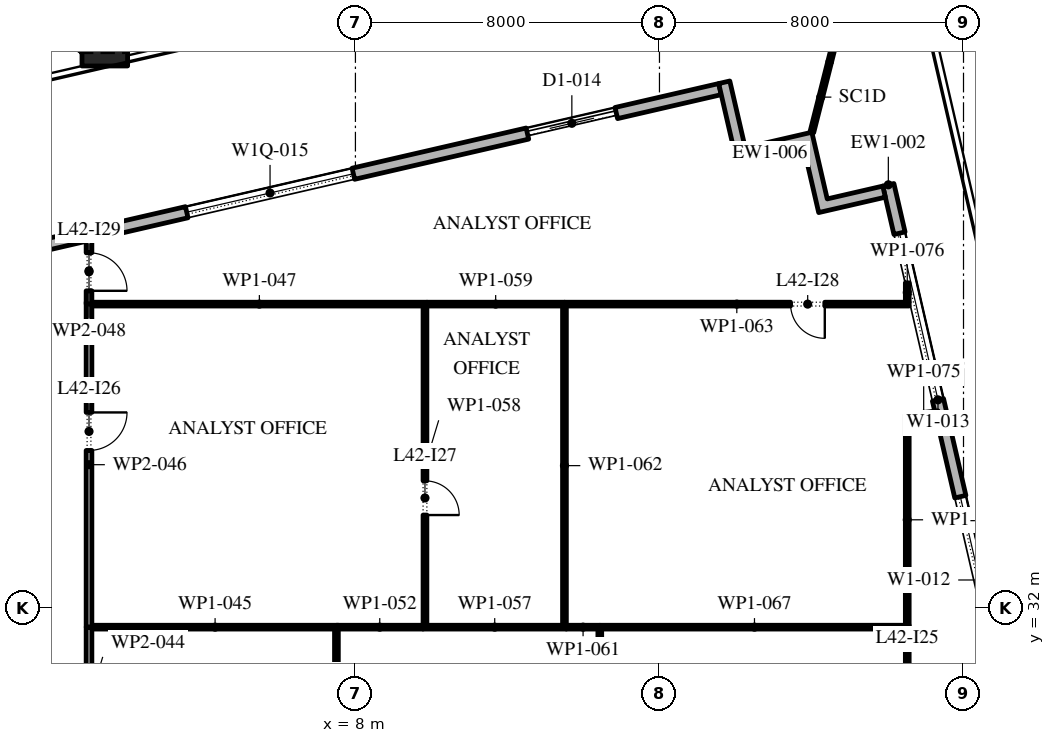
"""IFC4 building model, lengths in metres.
Left out: names, types, materials, properties, quantities, classifications, styles, units other than length and angle.
Written with IfcOpenShell. Run it as: python <this file> out.ifc"""

import sys

from ifc_helpers import new_model, si_unit, direction, frame, frame_2d, origin, origin_2d, place, context, subcontext, project, spatial, polyline, rectangle, outline, extrude, element, fill, save


model = new_model("IFC4")
c1 = context("Model", 3, precision=1e-05, world=origin(), true_north=direction((0.0, 1.0)))
c2 = subcontext(c1, "Body", "Model", "MODEL_VIEW")
j1 = project(units=[si_unit("LENGTHUNIT", "METRE"), si_unit("PLANEANGLEUNIT", "RADIAN")], contexts=[c1])
p1 = place(None, origin())
s1 = spatial("IfcSite", under=j1, at=p1, CompositionType="ELEMENT")
p2 = place(p1, origin())
s2 = spatial("IfcBuilding", under=s1, at=p2, CompositionType="ELEMENT")
p3 = place(p2, frame((0.0, 0.0, 192.6)))
s3 = spatial("IfcBuildingStorey", under=s2, at=p3, CompositionType="ELEMENT", Elevation=192.6)
p4 = place(p3, frame((1.406, 46.866, 0.0), z_axis=(-0.018883571463, 0.081616417765, 0.996484907603), x_axis=(-0.974262845894, -0.225414966474, 0.0)))
e1 = element("IfcColumn", 1, at=p4, inside=s3, PredefinedType="COLUMN", context=c2, shape_type="SweptSolid", body=[
    extrude(rectangle(XDim=1.2, YDim=1.2, at=origin_2d()), origin(), (0.0, 0.0, 1.0), 4.215),
])
p5 = place(p3, frame((33.157, -5.092, 0.0), z_axis=(0.0, 0.0, 1.0), x_axis=(-0.224950279389, 0.974370243697, 0.0)))
e2 = element("IfcWall", 2, at=p5, inside=s3, PredefinedType="STANDARD", context=c2, shape_type="SweptSolid", body=[
    extrude(rectangle(XDim=49.5, YDim=0.3, at=frame_2d((24.75, 0.0))), origin(), (0.0, 0.0, 1.0), 4.0),
])
p6 = place(p5, frame((2.207, 0.0, 0.0)))
e3 = element("IfcOpeningElement", 3, at=p6, cuts=e2, PredefinedType="OPENING", context=c2, shape_type="SweptSolid", body=[
    extrude(rectangle(XDim=2.4, YDim=3.125, at=frame_2d((1.2, 1.562))), frame((0.0, 0.16, 0.0), z_axis=(0.0, -1.0, 0.0), x_axis=(1.0, 0.0, 0.0)), (0.0, 0.0, 1.0), 0.32),
])
p7 = place(p5, frame((8.121, 0.0, 0.45)))
e4 = element("IfcOpeningElement", 4, at=p7, cuts=e2, PredefinedType="OPENING", context=c2, shape_type="SweptSolid", body=[
    extrude(rectangle(XDim=4.5, YDim=2.875, at=frame_2d((2.25, 1.438))), frame((0.0, 0.16, 0.0), z_axis=(0.0, -1.0, 0.0), x_axis=(1.0, 0.0, 0.0)), (0.0, 0.0, 1.0), 0.32),
])
p8 = place(p5, frame((15.236, 0.0, 0.45)))
e5 = element("IfcOpeningElement", 5, at=p8, cuts=e2, PredefinedType="OPENING", context=c2, shape_type="SweptSolid", body=[
    extrude(rectangle(XDim=4.5, YDim=2.875, at=frame_2d((2.25, 1.438))), frame((0.0, 0.16, 0.0), z_axis=(0.0, -1.0, 0.0), x_axis=(1.0, 0.0, 0.0)), (0.0, 0.0, 1.0), 0.32),
])
p9 = place(p5, frame((22.35, 0.0, 0.45)))
e6 = element("IfcOpeningElement", 6, at=p9, cuts=e2, PredefinedType="OPENING", context=c2, shape_type="SweptSolid", body=[
    extrude(rectangle(XDim=4.5, YDim=3.0, at=frame_2d((2.25, 1.5))), frame((0.0, 0.16, 0.0), z_axis=(0.0, -1.0, 0.0), x_axis=(1.0, 0.0, 0.0)), (0.0, 0.0, 1.0), 0.32),
])
p10 = place(p5, frame((30.514, 0.0, 0.0)))
e7 = element("IfcOpeningElement", 7, at=p10, cuts=e2, PredefinedType="OPENING", context=c2, shape_type="SweptSolid", body=[
    extrude(rectangle(XDim=2.4, YDim=3.45, at=frame_2d((1.2, 1.725))), frame((0.0, 0.16, 0.0), z_axis=(0.0, -1.0, 0.0), x_axis=(1.0, 0.0, 0.0)), (0.0, 0.0, 1.0), 0.32),
])
p11 = place(p5, frame((36.579, 0.0, 0.45)))
e8 = element("IfcOpeningElement", 8, at=p11, cuts=e2, PredefinedType="OPENING", context=c2, shape_type="SweptSolid", body=[
    extrude(rectangle(XDim=4.5, YDim=3.05, at=frame_2d((2.25, 1.525))), frame((0.0, 0.16, 0.0), z_axis=(0.0, -1.0, 0.0), x_axis=(1.0, 0.0, 0.0)), (0.0, 0.0, 1.0), 0.32),
])
p12 = place(p5, frame((43.693, 0.0, 0.45)))
e9 = element("IfcOpeningElement", 9, at=p12, cuts=e2, PredefinedType="OPENING", context=c2, shape_type="SweptSolid", body=[
    extrude(rectangle(XDim=4.5, YDim=3.05, at=frame_2d((2.25, 1.525))), frame((0.0, 0.16, 0.0), z_axis=(0.0, -1.0, 0.0), x_axis=(1.0, 0.0, 0.0)), (0.0, 0.0, 1.0), 0.32),
])
p13 = place(p3, frame((17.592, 45.657, 0.0), z_axis=(0.0, 0.0, 1.0), x_axis=(-0.974370243697, -0.224950279389, 0.0)))
e10 = element("IfcWall", 10, at=p13, inside=s3, PredefinedType="STANDARD", context=c2, shape_type="SweptSolid", body=[
    extrude(rectangle(XDim=49.5, YDim=0.3, at=frame_2d((24.75, 0.0))), origin(), (0.0, 0.0, 1.0), 4.0),
])
p14 = place(p13, frame((2.8, 0.0, 0.0)))
e11 = element("IfcOpeningElement", 11, at=p14, cuts=e10, PredefinedType="OPENING", context=c2, shape_type="SweptSolid", body=[
    extrude(rectangle(XDim=2.4, YDim=3.5, at=frame_2d((1.2, 1.75))), frame((0.0, 0.16, 0.0), z_axis=(0.0, -1.0, 0.0), x_axis=(1.0, 0.0, 0.0)), (0.0, 0.0, 1.0), 0.32),
])
p15 = place(p13, frame((9.9, 0.0, 0.45)))
e12 = element("IfcOpeningElement", 12, at=p15, cuts=e10, PredefinedType="OPENING", context=c2, shape_type="SweptSolid", body=[
    extrude(rectangle(XDim=4.5, YDim=2.45, at=frame_2d((2.25, 1.225))), frame((0.0, 0.16, 0.0), z_axis=(0.0, -1.0, 0.0), x_axis=(1.0, 0.0, 0.0)), (0.0, 0.0, 1.0), 0.32),
])
p16 = place(p13, frame((18.2, 0.0, 0.45)))
e13 = element("IfcOpeningElement", 13, at=p16, cuts=e10, PredefinedType="OPENING", context=c2, shape_type="SweptSolid", body=[
    extrude(rectangle(XDim=4.5, YDim=2.45, at=frame_2d((2.25, 1.225))), frame((0.0, 0.16, 0.0), z_axis=(0.0, -1.0, 0.0), x_axis=(1.0, 0.0, 0.0)), (0.0, 0.0, 1.0), 0.32),
])
p17 = place(p13, frame((26.5, 0.0, 0.45)))
e14 = element("IfcOpeningElement", 14, at=p17, cuts=e10, PredefinedType="OPENING", context=c2, shape_type="SweptSolid", body=[
    extrude(rectangle(XDim=4.5, YDim=2.525, at=frame_2d((2.25, 1.262))), frame((0.0, 0.16, 0.0), z_axis=(0.0, -1.0, 0.0), x_axis=(1.0, 0.0, 0.0)), (0.0, 0.0, 1.0), 0.32),
])
p18 = place(p13, frame((35.85, 0.0, 0.0)))
e15 = element("IfcOpeningElement", 15, at=p18, cuts=e10, PredefinedType="OPENING", context=c2, shape_type="SweptSolid", body=[
    extrude(rectangle(XDim=2.4, YDim=3.5, at=frame_2d((1.2, 1.75))), frame((0.0, 0.16, 0.0), z_axis=(0.0, -1.0, 0.0), x_axis=(1.0, 0.0, 0.0)), (0.0, 0.0, 1.0), 0.32),
])
p19 = place(p13, frame((43.1, 0.0, 0.45)))
e16 = element("IfcOpeningElement", 16, at=p19, cuts=e10, PredefinedType="OPENING", context=c2, shape_type="SweptSolid", body=[
    extrude(rectangle(XDim=4.5, YDim=2.675, at=frame_2d((2.25, 1.337))), frame((0.0, 0.16, 0.0), z_axis=(0.0, -1.0, 0.0), x_axis=(1.0, 0.0, 0.0)), (0.0, 0.0, 1.0), 0.32),
])
p20 = place(p3, origin())
e17 = element("IfcWall", 17, at=p20, inside=s3, PredefinedType="STANDARD", context=c2, shape_type="SweptSolid", body=[
    extrude(outline(polyline([(19.785, 44.162), (18.031, 43.757), (17.558, 45.803), (17.851, 45.871), (18.256, 44.117), (20.01, 44.522), (20.414, 42.768), (21.876, 43.105), (21.943, 42.813), (20.19, 42.408), (19.785, 44.162)])), origin(), (0.0, 0.0, 1.0), 4.0),
])
p21 = place(p3, frame((20.01, 44.522, -0.05), z_axis=(0.0, 0.0, 1.0), x_axis=(0.245426435893, 0.969415217832, 0.0)))
e18 = element("IfcWall", 18, at=p21, inside=s3, PredefinedType="STANDARD", context=c2, shape_type="SweptSolid", body=[
    extrude(rectangle(XDim=1.907, YDim=0.1, at=frame_2d((0.954, 0.0))), origin(), (0.0, 0.0, 1.0), 3.07),
])
p22 = place(p3, frame((0.99, 31.5, 0.0), z_axis=(0.0, 0.0, 1.0), x_axis=(0.0, -1.0, 0.0)))
e19 = element("IfcWall", 19, at=p22, inside=s3, PredefinedType="PARTITIONING", context=c2, shape_type="SweptSolid", body=[
    extrude(rectangle(XDim=3.95, YDim=0.15, at=frame_2d((1.975, 0.0))), origin(), (0.0, 0.0, 1.0), 4.0),
])
p23 = place(p22, frame((2.35, 0.0, 0.0)))
e20 = element("IfcOpeningElement", 20, at=p23, cuts=e19, PredefinedType="OPENING", context=c2, shape_type="SweptSolid", body=[
    extrude(rectangle(XDim=1.0, YDim=2.1, at=frame_2d((0.5, 1.05))), frame((0.0, 0.085, 0.0), z_axis=(0.0, -1.0, 0.0), x_axis=(1.0, 0.0, 0.0)), (0.0, 0.0, 1.0), 0.17),
])
p24 = place(p3, frame((1.065, 31.5, 0.0), z_axis=(0.0, 0.0, 1.0), x_axis=(1.0, 0.0, 0.0)))
e21 = element("IfcWall", 21, at=p24, inside=s3, PredefinedType="PARTITIONING", context=c2, shape_type="SweptSolid", body=[
    extrude(rectangle(XDim=6.485, YDim=0.1, at=frame_2d((3.243, 0.0))), origin(), (0.0, 0.0, 1.0), 4.0),
])
p25 = place(p3, frame((0.99, 40.05, 0.0), z_axis=(0.0, 0.0, 1.0), x_axis=(0.0, -1.0, 0.0)))
e22 = element("IfcWall", 22, at=p25, inside=s3, PredefinedType="PARTITIONING", context=c2, shape_type="SweptSolid", body=[
    extrude(rectangle(XDim=8.55, YDim=0.15, at=frame_2d((4.275, 0.0))), origin(), (0.0, 0.0, 1.0), 4.0),
])
p26 = place(p25, frame((2.9, 0.0, 0.0)))
e23 = element("IfcOpeningElement", 23, at=p26, cuts=e22, PredefinedType="OPENING", context=c2, shape_type="SweptSolid", body=[
    extrude(rectangle(XDim=1.0, YDim=2.1, at=frame_2d((0.5, 1.05))), frame((0.0, 0.085, 0.0), z_axis=(0.0, -1.0, 0.0), x_axis=(1.0, 0.0, 0.0)), (0.0, 0.0, 1.0), 0.17),
])
p27 = place(p3, frame((1.065, 40.0, 0.0), z_axis=(0.0, 0.0, 1.0), x_axis=(1.0, 0.0, 0.0)))
e24 = element("IfcWall", 24, at=p27, inside=s3, PredefinedType="PARTITIONING", context=c2, shape_type="SweptSolid", body=[
    extrude(rectangle(XDim=8.815, YDim=0.1, at=frame_2d((4.407, 0.0))), origin(), (0.0, 0.0, 1.0), 4.0),
])
p28 = place(p3, frame((0.99, 41.753, 0.0), z_axis=(0.0, 0.0, 1.0), x_axis=(0.0, -1.0, 0.0)))
e25 = element("IfcWall", 25, at=p28, inside=s3, PredefinedType="PARTITIONING", context=c2, shape_type="SweptSolid", body=[
    extrude(rectangle(XDim=1.753, YDim=0.15, at=frame_2d((0.876, 0.0))), origin(), (0.0, 0.0, 1.0), 4.0),
])
p29 = place(p28, frame((0.403, 0.0, 0.0)))
e26 = element("IfcOpeningElement", 26, at=p29, cuts=e25, PredefinedType="OPENING", context=c2, shape_type="SweptSolid", body=[
    extrude(rectangle(XDim=1.0, YDim=2.1, at=frame_2d((0.5, 1.05))), frame((0.0, 0.085, 0.0), z_axis=(0.0, -1.0, 0.0), x_axis=(1.0, 0.0, 0.0)), (0.0, 0.0, 1.0), 0.17),
])
p30 = place(p3, frame((7.5, 31.45, 0.0), z_axis=(0.0, 0.0, 1.0), x_axis=(0.0, -1.0, 0.0)))
e27 = element("IfcWall", 27, at=p30, inside=s3, PredefinedType="PARTITIONING", context=c2, shape_type="SweptSolid", body=[
    extrude(rectangle(XDim=3.9, YDim=0.1, at=frame_2d((1.95, 0.0))), origin(), (0.0, 0.0, 1.0), 4.0),
])
p31 = place(p30, frame((1.85, 0.0, 0.0)))
e28 = element("IfcOpeningElement", 28, at=p31, cuts=e27, PredefinedType="OPENING", context=c2, shape_type="SweptSolid", body=[
    extrude(rectangle(XDim=0.9, YDim=2.1, at=frame_2d((0.45, 1.05))), frame((0.0, 0.06, 0.0), z_axis=(0.0, -1.0, 0.0), x_axis=(1.0, 0.0, 0.0)), (0.0, 0.0, 1.0), 0.12),
])
p32 = place(p3, frame((7.5, 31.5, 0.0), z_axis=(0.0, 0.0, 1.0), x_axis=(1.0, 0.0, 0.0)))
e29 = element("IfcWall", 29, at=p32, inside=s3, PredefinedType="PARTITIONING", context=c2, shape_type="SweptSolid", body=[
    extrude(rectangle(XDim=2.28, YDim=0.1, at=frame_2d((1.14, 0.0))), origin(), (0.0, 0.0, 1.0), 4.0),
])
p33 = place(p3, frame((9.78, 31.5, 0.0), z_axis=(0.0, 0.0, 1.0), x_axis=(1.0, 0.0, 0.0)))
e30 = element("IfcWall", 30, at=p33, inside=s3, PredefinedType="PARTITIONING", context=c2, shape_type="SweptSolid", body=[
    extrude(rectangle(XDim=3.77, YDim=0.1, at=frame_2d((1.885, 0.0))), origin(), (0.0, 0.0, 1.0), 4.0),
])
p34 = place(p3, frame((9.83, 39.95, 0.0), z_axis=(0.0, 0.0, 1.0), x_axis=(0.0, -1.0, 0.0)))
e31 = element("IfcWall", 31, at=p34, inside=s3, PredefinedType="PARTITIONING", context=c2, shape_type="SweptSolid", body=[
    extrude(rectangle(XDim=8.4, YDim=0.1, at=frame_2d((4.2, 0.0))), origin(), (0.0, 0.0, 1.0), 4.0),
])
p35 = place(p34, frame((4.6, 0.0, 0.0)))
e32 = element("IfcOpeningElement", 32, at=p35, cuts=e31, PredefinedType="OPENING", context=c2, shape_type="SweptSolid", body=[
    extrude(rectangle(XDim=0.9, YDim=2.1, at=frame_2d((0.45, 1.05))), frame((0.0, 0.06, 0.0), z_axis=(0.0, -1.0, 0.0), x_axis=(1.0, 0.0, 0.0)), (0.0, 0.0, 1.0), 0.12),
])
p36 = place(p3, frame((9.88, 40.0, 0.0), z_axis=(0.0, 0.0, 1.0), x_axis=(1.0, 0.0, 0.0)))
e33 = element("IfcWall", 33, at=p36, inside=s3, PredefinedType="PARTITIONING", context=c2, shape_type="SweptSolid", body=[
    extrude(rectangle(XDim=3.62, YDim=0.1, at=frame_2d((1.81, 0.0))), origin(), (0.0, 0.0, 1.0), 4.0),
])
p37 = place(p3, frame((13.55, 31.5, 0.0), z_axis=(0.0, 0.0, 1.0), x_axis=(1.0, 0.0, 0.0)))
e34 = element("IfcWall", 34, at=p37, inside=s3, PredefinedType="PARTITIONING", context=c2, shape_type="SweptSolid", body=[
    extrude(rectangle(XDim=0.88, YDim=0.1, at=frame_2d((0.44, 0.0))), origin(), (0.0, 0.0, 1.0), 4.0),
])
p38 = place(p3, frame((13.5, 39.95, 0.0), z_axis=(0.0, 0.0, 1.0), x_axis=(0.0, -1.0, 0.0)))
e35 = element("IfcWall", 35, at=p38, inside=s3, PredefinedType="PARTITIONING", context=c2, shape_type="SweptSolid", body=[
    extrude(rectangle(XDim=8.4, YDim=0.1, at=frame_2d((4.2, 0.0))), origin(), (0.0, 0.0, 1.0), 4.0),
])
p39 = place(p3, frame((13.5, 40.0, 0.0), z_axis=(0.0, 0.0, 1.0), x_axis=(1.0, 0.0, 0.0)))
e36 = element("IfcWall", 36, at=p39, inside=s3, PredefinedType="PARTITIONING", context=c2, shape_type="SweptSolid", body=[
    extrude(rectangle(XDim=9.07, YDim=0.1, at=frame_2d((4.535, 0.0))), origin(), (0.0, 0.0, 1.0), 4.0),
])
p40 = place(p39, frame((5.95, 0.0, 0.0)))
e37 = element("IfcOpeningElement", 37, at=p40, cuts=e36, PredefinedType="OPENING", context=c2, shape_type="SweptSolid", body=[
    extrude(rectangle(XDim=0.9, YDim=2.1, at=frame_2d((0.45, 1.05))), frame((0.0, 0.06, 0.0), z_axis=(0.0, -1.0, 0.0), x_axis=(1.0, 0.0, 0.0)), (0.0, 0.0, 1.0), 0.12),
])
p41 = place(p3, frame((14.43, 31.45, 0.0), z_axis=(0.0, 0.0, 1.0), x_axis=(0.0, -1.0, 0.0)))
e38 = element("IfcWall", 38, at=p41, inside=s3, PredefinedType="PARTITIONING", context=c2, shape_type="SweptSolid", body=[
    extrude(rectangle(XDim=6.05, YDim=0.1, at=frame_2d((3.025, 0.0))), origin(), (0.0, 0.0, 1.0), 4.0),
])
p42 = place(p3, frame((14.43, 31.5, 0.0), z_axis=(0.0, 0.0, 1.0), x_axis=(1.0, 0.0, 0.0)))
e39 = element("IfcWall", 39, at=p42, inside=s3, PredefinedType="PARTITIONING", context=c2, shape_type="SweptSolid", body=[
    extrude(rectangle(XDim=8.14, YDim=0.1, at=frame_2d((4.07, 0.0))), origin(), (0.0, 0.0, 1.0), 4.0),
])
p43 = place(p3, frame((22.52, 27.275, 0.0), z_axis=(0.0, 0.0, 1.0), x_axis=(0.0, 1.0, 0.0)))
e40 = element("IfcWall", 40, at=p43, inside=s3, PredefinedType="PARTITIONING", context=c2, shape_type="SweptSolid", body=[
    extrude(rectangle(XDim=4.175, YDim=0.1, at=frame_2d((2.087, 0.0))), origin(), (0.0, 0.0, 1.0), 4.0),
])
p44 = place(p43, frame((2.375, 0.0, 0.0)))
e41 = element("IfcOpeningElement", 41, at=p44, cuts=e40, PredefinedType="OPENING", context=c2, shape_type="SweptSolid", body=[
    extrude(rectangle(XDim=0.9, YDim=2.1, at=frame_2d((0.45, 1.05))), frame((0.0, 0.06, 0.0), z_axis=(0.0, -1.0, 0.0), x_axis=(1.0, 0.0, 0.0)), (0.0, 0.0, 1.0), 0.12),
])
p45 = place(p3, frame((22.52, 31.55, 0.0), z_axis=(0.0, 0.0, 1.0), x_axis=(0.0, 1.0, 0.0)))
e42 = element("IfcWall", 42, at=p45, inside=s3, PredefinedType="PARTITIONING", context=c2, shape_type="SweptSolid", body=[
    extrude(rectangle(XDim=5.55, YDim=0.1, at=frame_2d((2.775, 0.0))), origin(), (0.0, 0.0, 1.0), 4.0),
])
p46 = place(p3, frame((22.57, 37.056, 0.0), z_axis=(0.0, 0.0, 1.0), x_axis=(0.993410326243, 0.114612057454, 0.0)))
e43 = element("IfcWall", 43, at=p46, inside=s3, PredefinedType="PARTITIONING", context=c2, shape_type="SweptSolid", body=[
    extrude(rectangle(XDim=0.769, YDim=0.1, at=frame_2d((0.385, 0.0))), origin(), (0.0, 0.0, 1.0), 4.0),
])
p47 = place(p3, frame((22.52, 40.05, 0.0), z_axis=(0.0, 0.0, 1.0), x_axis=(0.0, 1.0, 0.0)))
e44 = element("IfcWall", 44, at=p47, inside=s3, PredefinedType="PARTITIONING", context=c2, shape_type="SweptSolid", body=[
    extrude(rectangle(XDim=0.51, YDim=0.1, at=frame_2d((0.255, 0.0))), origin(), (0.0, 0.0, 1.0), 4.0),
])
p48 = place(p3, frame((20.478, 46.371, -0.05), z_axis=(0.0, 0.0, 1.0), x_axis=(0.245413649937, 0.969418454758, 0.0)))
e45 = element("IfcWall", 45, at=p48, inside=s3, PredefinedType="STANDARD", context=c2, shape_type="SweptSolid", body=[
    extrude(rectangle(XDim=2.474, YDim=0.1, at=frame_2d((1.237, 0.0))), origin(), (0.0, 0.0, 1.0), 4.05),
])
p49 = place(p11, origin())
e46 = element("IfcWindow", 46, at=p49, inside=s3, PartitioningType="DOUBLE_PANEL_VERTICAL", PredefinedType="WINDOW", context=c2, shape_type="SweptSolid", body=[
    extrude(rectangle(XDim=4.5, YDim=3.05, at=frame_2d((2.25, 1.525))), frame((0.0, 0.03, 0.0), z_axis=(0.0, -1.0, 0.0), x_axis=(1.0, 0.0, 0.0)), (0.0, 0.0, 1.0), 0.06),
])
fill(e8, e46)
p50 = place(p12, origin())
e47 = element("IfcWindow", 47, at=p50, inside=s3, PartitioningType="DOUBLE_PANEL_VERTICAL", PredefinedType="WINDOW", context=c2, shape_type="SweptSolid", body=[
    extrude(rectangle(XDim=4.5, YDim=3.05, at=frame_2d((2.25, 1.525))), frame((0.0, 0.03, 0.0), z_axis=(0.0, -1.0, 0.0), x_axis=(1.0, 0.0, 0.0)), (0.0, 0.0, 1.0), 0.06),
])
fill(e9, e47)
p51 = place(p14, origin())
e48 = element("IfcDoor", 48, at=p51, inside=s3, OperationType="DOUBLE_DOOR_SLIDING", PredefinedType="DOOR", context=c2, shape_type="SweptSolid", body=[
    extrude(rectangle(XDim=2.4, YDim=3.5, at=frame_2d((1.2, 1.75))), frame((0.0, 0.025, 0.0), z_axis=(0.0, -1.0, 0.0), x_axis=(1.0, 0.0, 0.0)), (0.0, 0.0, 1.0), 0.05),
])
fill(e11, e48)
p52 = place(p15, origin())
e49 = element("IfcWindow", 49, at=p52, inside=s3, PartitioningType="DOUBLE_PANEL_VERTICAL", PredefinedType="WINDOW", context=c2, shape_type="SweptSolid", body=[
    extrude(rectangle(XDim=4.5, YDim=2.45, at=frame_2d((2.25, 1.225))), frame((0.0, 0.03, 0.0), z_axis=(0.0, -1.0, 0.0), x_axis=(1.0, 0.0, 0.0)), (0.0, 0.0, 1.0), 0.06),
])
fill(e12, e49)
p53 = place(p26, origin())
e50 = element("IfcDoor", 50, at=p53, inside=s3, OperationType="SINGLE_SWING_RIGHT", PredefinedType="DOOR", context=c2, shape_type="SweptSolid", body=[
    extrude(rectangle(XDim=1.0, YDim=2.1, at=frame_2d((0.5, 1.05))), frame((0.0, 0.025, 0.0), z_axis=(0.0, -1.0, 0.0), x_axis=(1.0, 0.0, 0.0)), (0.0, 0.0, 1.0), 0.05),
])
fill(e23, e50)
p54 = place(p35, origin())
e51 = element("IfcDoor", 51, at=p54, inside=s3, OperationType="SINGLE_SWING_LEFT", PredefinedType="DOOR", context=c2, shape_type="SweptSolid", body=[
    extrude(rectangle(XDim=0.9, YDim=2.1, at=frame_2d((0.45, 1.05))), frame((0.0, 0.025, 0.0), z_axis=(0.0, -1.0, 0.0), x_axis=(1.0, 0.0, 0.0)), (0.0, 0.0, 1.0), 0.05),
])
fill(e32, e51)
p55 = place(p40, frame((0.9, 0.0, 0.0), z_axis=(0.0, 0.0, 1.0), x_axis=(-1.0, 0.0, 0.0)))
e52 = element("IfcDoor", 52, at=p55, inside=s3, OperationType="SINGLE_SWING_RIGHT", PredefinedType="DOOR", context=c2, shape_type="SweptSolid", body=[
    extrude(rectangle(XDim=0.9, YDim=2.1, at=frame_2d((0.45, 1.05))), frame((0.0, 0.025, 0.0), z_axis=(0.0, -1.0, 0.0), x_axis=(1.0, 0.0, 0.0)), (0.0, 0.0, 1.0), 0.05),
])
fill(e37, e52)
p56 = place(p29, origin())
e53 = element("IfcDoor", 53, at=p56, inside=s3, OperationType="SINGLE_SWING_LEFT", PredefinedType="DOOR", context=c2, shape_type="SweptSolid", body=[
    extrude(rectangle(XDim=1.0, YDim=2.1, at=frame_2d((0.5, 1.05))), frame((0.0, 0.025, 0.0), z_axis=(0.0, -1.0, 0.0), x_axis=(1.0, 0.0, 0.0)), (0.0, 0.0, 1.0), 0.05),
])
fill(e26, e53)
save(model, sys.argv[1])
